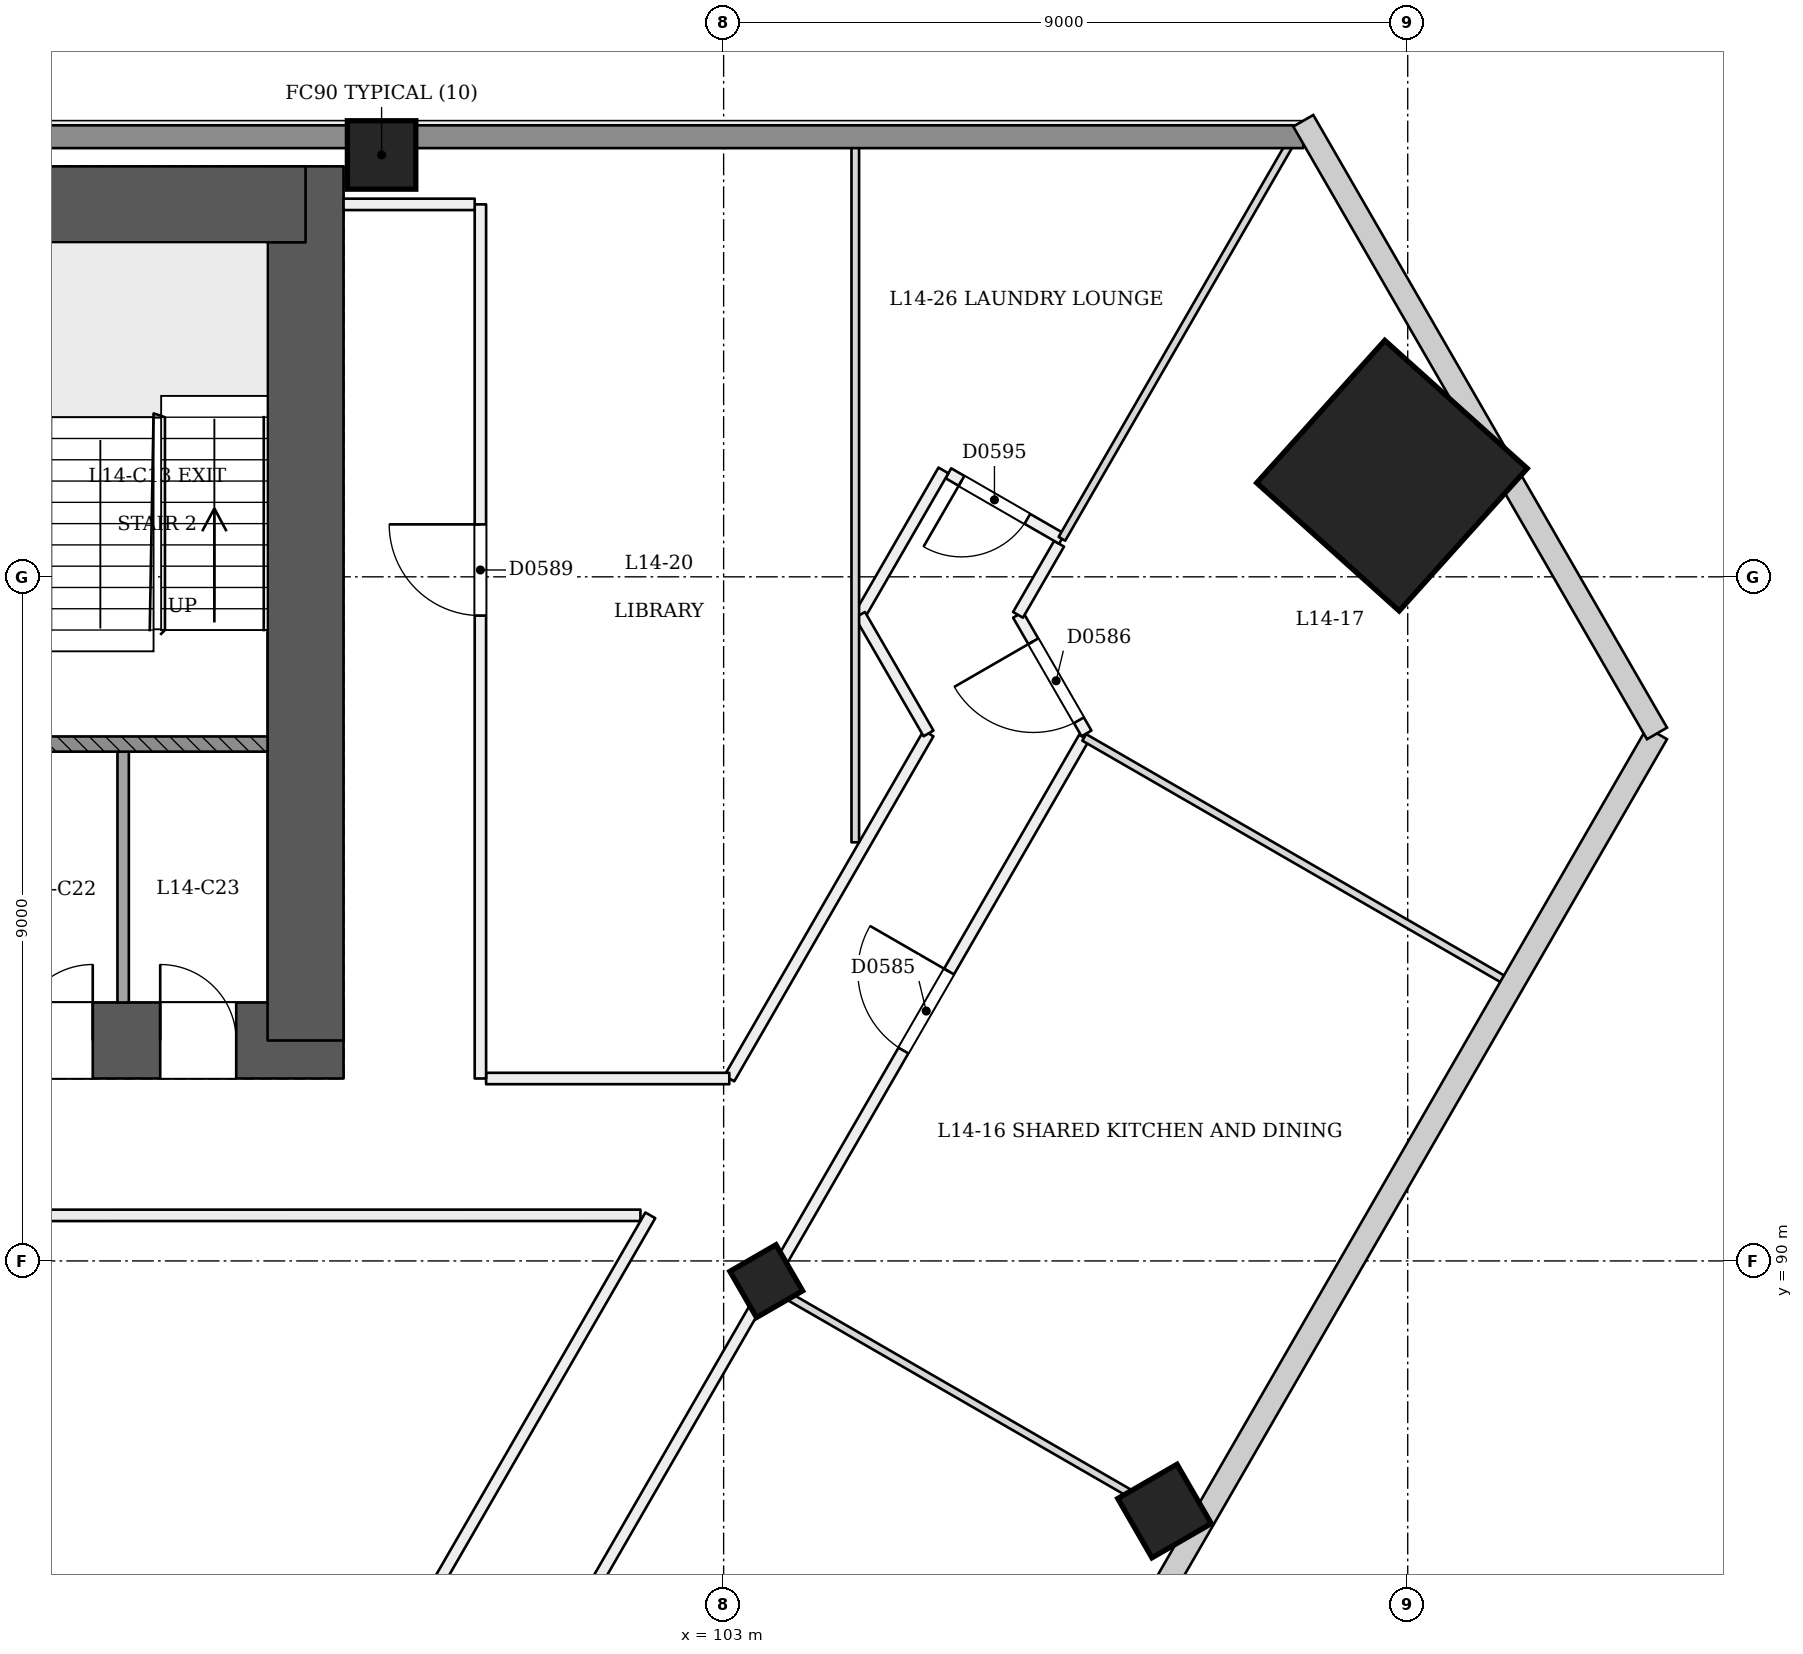
"""IFC4 building model, lengths in metres.
Left out: names, types, materials, properties, quantities, classifications, styles, units other than length and angle.
Written with IfcOpenShell. Run it as: python <this file> out.ifc"""

import sys

from ifc_helpers import new_model, si_unit, direction, frame, frame_2d, origin, origin_2d, place, context, subcontext, project, spatial, rectangle, extrude, element, fill, save


model = new_model("IFC4")
c1 = context("Model", 3, precision=1e-05, world=origin(), true_north=direction((0.0, 1.0)))
c2 = subcontext(c1, "Body", "Model", "MODEL_VIEW")
j1 = project(units=[si_unit("LENGTHUNIT", "METRE"), si_unit("PLANEANGLEUNIT", "RADIAN")], contexts=[c1])
p1 = place(None, origin())
s1 = spatial("IfcSite", under=j1, at=p1, CompositionType="ELEMENT")
p2 = place(p1, origin())
s2 = spatial("IfcBuilding", under=s1, at=p2, CompositionType="ELEMENT")
p3 = place(p2, frame((0.0, 0.0, 59.4)))
s3 = spatial("IfcBuildingStorey", under=s2, at=p3, CompositionType="ELEMENT", Elevation=59.4)
p4 = place(p3, frame((72.5, 92.9, 0.0), z_axis=(0.0, 0.0, 1.0), x_axis=(1.0, 0.0, 0.0)))
e1 = element("IfcWall", 1, at=p4, inside=s3, PredefinedType="SHEAR", context=c2, shape_type="SweptSolid", body=[
    extrude(rectangle(XDim=25.5, YDim=1.0, at=frame_2d((12.75, 0.0))), origin(), (0.0, 0.0, 1.0), 3.6),
])
p5 = place(p4, frame((1.3, 0.0, 0.0)))
e2 = element("IfcOpeningElement", 2, at=p5, cuts=e1, PredefinedType="OPENING", context=c2, shape_type="SweptSolid", body=[
    extrude(rectangle(XDim=1.2, YDim=2.1, at=frame_2d((0.6, 1.05))), frame((0.0, 0.51, 0.0), z_axis=(0.0, -1.0, 0.0), x_axis=(1.0, 0.0, 0.0)), (0.0, 0.0, 1.0), 1.021),
])
p6 = place(p4, frame((3.5, 0.0, 0.0)))
e3 = element("IfcOpeningElement", 3, at=p6, cuts=e1, PredefinedType="OPENING", context=c2, shape_type="SweptSolid", body=[
    extrude(rectangle(XDim=1.2, YDim=2.1, at=frame_2d((0.6, 1.05))), frame((0.0, 0.51, 0.0), z_axis=(0.0, -1.0, 0.0), x_axis=(1.0, 0.0, 0.0)), (0.0, 0.0, 1.0), 1.021),
])
p7 = place(p4, frame((13.5, 0.0, 0.0)))
e4 = element("IfcOpeningElement", 4, at=p7, cuts=e1, PredefinedType="OPENING", context=c2, shape_type="SweptSolid", body=[
    extrude(rectangle(XDim=1.2, YDim=2.1, at=frame_2d((0.6, 1.05))), frame((0.0, 0.51, 0.0), z_axis=(0.0, -1.0, 0.0), x_axis=(1.0, 0.0, 0.0)), (0.0, 0.0, 1.0), 1.021),
])
p8 = place(p4, frame((15.462, 0.0, 0.0)))
e5 = element("IfcOpeningElement", 5, at=p8, cuts=e1, PredefinedType="OPENING", context=c2, shape_type="SweptSolid", body=[
    extrude(rectangle(XDim=1.0, YDim=2.1, at=frame_2d((0.5, 1.05))), frame((0.0, 0.51, 0.0), z_axis=(0.0, -1.0, 0.0), x_axis=(1.0, 0.0, 0.0)), (0.0, 0.0, 1.0), 1.021),
])
p9 = place(p4, frame((18.3, 0.0, 0.0)))
e6 = element("IfcOpeningElement", 6, at=p9, cuts=e1, PredefinedType="OPENING", context=c2, shape_type="SweptSolid", body=[
    extrude(rectangle(XDim=1.0, YDim=2.1, at=frame_2d((0.5, 1.05))), frame((0.0, 0.51, 0.0), z_axis=(0.0, -1.0, 0.0), x_axis=(1.0, 0.0, 0.0)), (0.0, 0.0, 1.0), 1.021),
])
p10 = place(p4, frame((21.2, 0.0, 0.0)))
e7 = element("IfcOpeningElement", 7, at=p10, cuts=e1, PredefinedType="OPENING", context=c2, shape_type="SweptSolid", body=[
    extrude(rectangle(XDim=1.0, YDim=2.1, at=frame_2d((0.5, 1.05))), frame((0.0, 0.51, 0.0), z_axis=(0.0, -1.0, 0.0), x_axis=(1.0, 0.0, 0.0)), (0.0, 0.0, 1.0), 1.021),
])
p11 = place(p4, frame((23.087, 0.0, 0.0)))
e8 = element("IfcOpeningElement", 8, at=p11, cuts=e1, PredefinedType="OPENING", context=c2, shape_type="SweptSolid", body=[
    extrude(rectangle(XDim=1.0, YDim=2.1, at=frame_2d((0.5, 1.05))), frame((0.0, 0.51, 0.0), z_axis=(0.0, -1.0, 0.0), x_axis=(1.0, 0.0, 0.0)), (0.0, 0.0, 1.0), 1.021),
])
p12 = place(p3, frame((97.5, 92.9, 0.0), z_axis=(0.0, 0.0, 1.0), x_axis=(0.0, 1.0, 0.0)))
e9 = element("IfcWall", 9, at=p12, inside=s3, PredefinedType="SHEAR", context=c2, shape_type="SweptSolid", body=[
    extrude(rectangle(XDim=11.5, YDim=1.0, at=frame_2d((5.75, 0.0))), origin(), (0.0, 0.0, 1.0), 3.6),
])
p13 = place(p3, frame((97.5, 103.9, 0.0), z_axis=(0.0, 0.0, 1.0), x_axis=(-1.0, 0.0, 0.0)))
e10 = element("IfcWall", 10, at=p13, inside=s3, PredefinedType="SHEAR", context=c2, shape_type="SweptSolid", body=[
    extrude(rectangle(XDim=25.5, YDim=1.0, at=frame_2d((12.75, 0.0))), origin(), (0.0, 0.0, 1.0), 3.6),
])
p14 = place(p3, frame((103.588, 89.688, -0.021), z_axis=(-0.02215369191, 0.038413282303, 0.999016333038), x_axis=(-0.500657396395, -0.86536153355, 0.022171776814)))
e11 = element("IfcColumn", 11, at=p14, inside=s3, PredefinedType="COLUMN", context=c2, shape_type="SweptSolid", body=[
    extrude(rectangle(XDim=0.7, YDim=0.7, at=origin_2d()), origin(), (0.0, 0.0, 1.0), 3.604),
])
p15 = place(p3, frame((111.827, 100.32, 0.0), z_axis=(-0.028401796786, 0.009286506348, 0.999553449666), x_axis=(0.498886398949, -0.86638237317, 0.022224860049)))
e12 = element("IfcColumn", 12, at=p15, inside=s3, PredefinedType="COLUMN", context=c2, shape_type="SweptSolid", body=[
    extrude(rectangle(XDim=2.52, YDim=2.52, at=origin_2d()), origin(), (0.0, 0.0, 1.0), 3.602),
])
p16 = place(p3, frame((98.5, 104.55, 0.0), z_axis=(0.0, 0.0, 1.0), x_axis=(1.0, 0.0, 0.0)))
e13 = element("IfcColumn", 13, at=p16, inside=s3, PredefinedType="COLUMN", context=c2, shape_type="SweptSolid", body=[
    extrude(rectangle(XDim=0.9, YDim=0.9, at=origin_2d()), origin(), (0.0, 0.0, 1.0), 3.6),
])
p17 = place(p3, frame((108.828, 86.662, -0.027), z_axis=(-0.022222852987, 0.038483477124, 0.999012095419), x_axis=(-0.500174611287, -0.865639447942, 0.022219459744)))
e14 = element("IfcColumn", 14, at=p17, inside=s3, PredefinedType="COLUMN", context=c2, shape_type="SweptSolid", body=[
    extrude(rectangle(XDim=0.9, YDim=0.9, at=origin_2d()), origin(), (0.0, 0.0, 1.0), 3.604),
])
p18 = place(p3, frame((85.931, 59.106, 0.0), z_axis=(0.0, 0.0, 1.0), x_axis=(0.499999543107, 0.866025667572, 0.0)))
e15 = element("IfcWall", 15, at=p18, inside=s3, PredefinedType="PARTITIONING", context=c2, shape_type="SweptSolid", body=[
    extrude(rectangle(XDim=43.626, YDim=0.15, at=frame_2d((21.813, 0.0))), origin(), (0.0, 0.0, 1.0), 2.7),
])
p19 = place(p18, frame((3.556, 0.0, 0.0)))
e16 = element("IfcOpeningElement", 16, at=p19, cuts=e15, PredefinedType="OPENING", context=c2, shape_type="SweptSolid", body=[
    extrude(rectangle(XDim=1.2, YDim=2.1, at=frame_2d((0.6, 1.05))), frame((0.0, 0.085, 0.0), z_axis=(0.0, -1.0, 0.0), x_axis=(1.0, 0.0, 0.0)), (0.0, 0.0, 1.0), 0.171),
])
p20 = place(p18, frame((14.463, 0.0, 0.0)))
e17 = element("IfcOpeningElement", 17, at=p20, cuts=e15, PredefinedType="OPENING", context=c2, shape_type="SweptSolid", body=[
    extrude(rectangle(XDim=1.2, YDim=2.1, at=frame_2d((0.6, 1.05))), frame((0.0, 0.085, 0.0), z_axis=(0.0, -1.0, 0.0), x_axis=(1.0, 0.0, 0.0)), (0.0, 0.0, 1.0), 0.171),
])
p21 = place(p18, frame((27.963, 0.0, 0.0)))
e18 = element("IfcOpeningElement", 18, at=p21, cuts=e15, PredefinedType="OPENING", context=c2, shape_type="SweptSolid", body=[
    extrude(rectangle(XDim=1.2, YDim=2.1, at=frame_2d((0.6, 1.05))), frame((0.0, 0.085, 0.0), z_axis=(0.0, -1.0, 0.0), x_axis=(1.0, 0.0, 0.0)), (0.0, 0.0, 1.0), 0.171),
])
p22 = place(p18, frame((38.869, 0.0, 0.0)))
e19 = element("IfcOpeningElement", 19, at=p22, cuts=e15, PredefinedType="OPENING", context=c2, shape_type="SweptSolid", body=[
    extrude(rectangle(XDim=1.2, YDim=2.1, at=frame_2d((0.6, 1.05))), frame((0.0, 0.085, 0.0), z_axis=(0.0, -1.0, 0.0), x_axis=(1.0, 0.0, 0.0)), (0.0, 0.0, 1.0), 0.171),
])
p23 = place(p3, frame((107.774, 96.94, 0.0), z_axis=(0.0, 0.0, 1.0), x_axis=(-0.500015694476, 0.866016342385, 0.0)))
e20 = element("IfcWall", 20, at=p23, inside=s3, PredefinedType="PARTITIONING", context=c2, shape_type="SweptSolid", body=[
    extrude(rectangle(XDim=1.802, YDim=0.15, at=frame_2d((0.901, 0.0))), origin(), (0.0, 0.0, 1.0), 3.1),
])
p24 = place(p23, frame((0.2, 0.0, 0.0)))
e21 = element("IfcOpeningElement", 21, at=p24, cuts=e20, PredefinedType="OPENING", context=c2, shape_type="SweptSolid", body=[
    extrude(rectangle(XDim=1.2, YDim=2.1, at=frame_2d((0.6, 1.05))), frame((0.0, 0.085, 0.0), z_axis=(0.0, -1.0, 0.0), x_axis=(1.0, 0.0, 0.0)), (0.0, 0.0, 1.0), 0.171),
])
p25 = place(p3, frame((106.873, 98.5, 0.0), z_axis=(0.0, 0.0, 1.0), x_axis=(0.499957341738, 0.866050031143, 0.0)))
e22 = element("IfcWall", 22, at=p25, inside=s3, PredefinedType="PARTITIONING", context=c2, shape_type="SweptSolid", body=[
    extrude(rectangle(XDim=1.08, YDim=0.15, at=frame_2d((0.54, 0.0))), origin(), (0.0, 0.0, 1.0), 3.1),
])
p26 = place(p3, frame((102.035, 90.6, 0.0), z_axis=(0.0, 0.0, 1.0), x_axis=(-0.49999785657, -0.866026641291, 0.0)))
e23 = element("IfcWall", 23, at=p26, inside=s3, PredefinedType="PARTITIONING", context=c2, shape_type="SweptSolid", body=[
    extrude(rectangle(XDim=34.071, YDim=0.15, at=frame_2d((17.036, 0.0))), origin(), (0.0, 0.0, 1.0), 3.1),
])
p27 = place(p26, frame((25.659, 0.0, 0.0)))
e24 = element("IfcOpeningElement", 24, at=p27, cuts=e23, PredefinedType="OPENING", context=c2, shape_type="SweptSolid", body=[
    extrude(rectangle(XDim=1.2, YDim=2.1, at=frame_2d((0.6, 1.05))), frame((0.0, 0.085, 0.0), z_axis=(0.0, -1.0, 0.0), x_axis=(1.0, 0.0, 0.0)), (0.0, 0.0, 1.0), 0.171),
])
p28 = place(p26, frame((6.829, 0.0, 0.0)))
e25 = element("IfcOpeningElement", 25, at=p28, cuts=e23, PredefinedType="OPENING", context=c2, shape_type="SweptSolid", body=[
    extrude(rectangle(XDim=1.2, YDim=2.1, at=frame_2d((0.6, 1.05))), frame((0.0, 0.085, 0.0), z_axis=(0.0, -1.0, 0.0), x_axis=(1.0, 0.0, 0.0)), (0.0, 0.0, 1.0), 0.171),
])
p29 = place(p3, frame((88.0, 90.599, 0.0), z_axis=(0.0, 0.0, 1.0), x_axis=(0.999999997534, 7.0228418e-05, 0.0)))
e26 = element("IfcWall", 26, at=p29, inside=s3, PredefinedType="PARTITIONING", context=c2, shape_type="SweptSolid", body=[
    extrude(rectangle(XDim=13.906, YDim=0.15, at=frame_2d((6.953, 0.0))), origin(), (0.0, 0.0, 1.0), 3.1),
])
p30 = place(p29, frame((0.2, 0.0, 0.0)))
e27 = element("IfcOpeningElement", 27, at=p30, cuts=e26, PredefinedType="OPENING", context=c2, shape_type="SweptSolid", body=[
    extrude(rectangle(XDim=1.2, YDim=2.1, at=frame_2d((0.6, 1.05))), frame((0.0, 0.085, 0.0), z_axis=(0.0, -1.0, 0.0), x_axis=(1.0, 0.0, 0.0)), (0.0, 0.0, 1.0), 0.171),
])
p31 = place(p3, frame((105.696, 96.94, 0.0), z_axis=(0.0, 0.0, 1.0), x_axis=(-0.499971068387, -0.866042106815, 0.0)))
e28 = element("IfcWall", 28, at=p31, inside=s3, PredefinedType="PARTITIONING", context=c2, shape_type="SweptSolid", body=[
    extrude(rectangle(XDim=5.242, YDim=0.15, at=frame_2d((2.621, 0.0))), origin(), (0.0, 0.0, 1.0), 3.1),
])
p32 = place(p3, frame((103.075, 92.4, 0.0), z_axis=(0.0, 0.0, 1.0), x_axis=(-1.0, 0.0, 0.0)))
e29 = element("IfcWall", 29, at=p32, inside=s3, PredefinedType="PARTITIONING", context=c2, shape_type="SweptSolid", body=[
    extrude(rectangle(XDim=3.2, YDim=0.15, at=frame_2d((1.6, 0.0))), origin(), (0.0, 0.0, 1.0), 3.1),
])
p33 = place(p3, frame((99.8, 92.4, 0.0), z_axis=(0.0, 0.0, 1.0), x_axis=(0.0, 1.0, 0.0)))
e30 = element("IfcWall", 30, at=p33, inside=s3, PredefinedType="PARTITIONING", context=c2, shape_type="SweptSolid", body=[
    extrude(rectangle(XDim=11.5, YDim=0.15, at=frame_2d((5.75, 0.0))), origin(), (0.0, 0.0, 1.0), 2.6),
])
p34 = place(p33, frame((6.09, 0.0, 0.0)))
e31 = element("IfcOpeningElement", 31, at=p34, cuts=e30, PredefinedType="OPENING", context=c2, shape_type="SweptSolid", body=[
    extrude(rectangle(XDim=1.2, YDim=2.1, at=frame_2d((0.6, 1.05))), frame((0.0, 0.085, 0.0), z_axis=(0.0, -1.0, 0.0), x_axis=(1.0, 0.0, 0.0)), (0.0, 0.0, 1.0), 0.171),
])
p35 = place(p3, frame((99.725, 103.9, 0.0), z_axis=(0.0, 0.0, 1.0), x_axis=(-1.0, 0.0, 0.0)))
e32 = element("IfcWall", 32, at=p35, inside=s3, PredefinedType="PARTITIONING", context=c2, shape_type="SweptSolid", body=[
    extrude(rectangle(XDim=1.725, YDim=0.15, at=frame_2d((0.863, 0.0))), origin(), (0.0, 0.0, 1.0), 2.6),
])
p36 = place(p3, frame((107.45, 99.5, 0.0), z_axis=(0.0, 0.0, 1.0), x_axis=(-0.866013532718, 0.500020560727, 0.0)))
e33 = element("IfcWall", 33, at=p36, inside=s3, PredefinedType="PARTITIONING", context=c2, shape_type="SweptSolid", body=[
    extrude(rectangle(XDim=1.725, YDim=0.15, at=frame_2d((0.863, 0.0))), origin(), (0.0, 0.0, 1.0), 3.1),
])
p37 = place(p36, frame((0.525, 0.0, 0.0)))
e34 = element("IfcOpeningElement", 34, at=p37, cuts=e33, PredefinedType="OPENING", context=c2, shape_type="SweptSolid", body=[
    extrude(rectangle(XDim=1.0, YDim=2.1, at=frame_2d((0.5, 1.05))), frame((0.0, 0.085, 0.0), z_axis=(0.0, -1.0, 0.0), x_axis=(1.0, 0.0, 0.0)), (0.0, 0.0, 1.0), 0.171),
])
p38 = place(p3, frame((105.892, 100.4, 0.0), z_axis=(0.0, 0.0, 1.0), x_axis=(-0.500005024956, -0.866022502605, 0.0)))
e35 = element("IfcWall", 35, at=p38, inside=s3, PredefinedType="PARTITIONING", context=c2, shape_type="SweptSolid", body=[
    extrude(rectangle(XDim=2.194, YDim=0.15, at=frame_2d((1.097, 0.0))), origin(), (0.0, 0.0, 1.0), 3.1),
])
p39 = place(p3, frame((104.795, 98.5, 0.0), z_axis=(0.0, 0.0, 1.0), x_axis=(0.500015694476, -0.866016342385, 0.0)))
e36 = element("IfcWall", 36, at=p39, inside=s3, PredefinedType="PARTITIONING", context=c2, shape_type="SweptSolid", body=[
    extrude(rectangle(XDim=1.802, YDim=0.15, at=frame_2d((0.901, 0.0))), origin(), (0.0, 0.0, 1.0), 3.1),
])
p40 = place(p3, frame((109.13, 86.488, 0.0), z_axis=(0.0, 0.0, 1.0), x_axis=(-0.866042250622, 0.499970819286, 0.0)))
e37 = element("IfcWall", 37, at=p40, inside=s3, PredefinedType="PARTITIONING", context=c2, shape_type="SweptSolid", body=[
    extrude(rectangle(XDim=6.325, YDim=0.1, at=frame_2d((3.163, 0.0))), origin(), (0.0, 0.0, 1.0), 2.6),
])
p41 = place(p3, frame((113.287, 93.688, 0.0), z_axis=(0.0, 0.0, 1.0), x_axis=(-0.866035036182, 0.499983315828, 0.0)))
e38 = element("IfcWall", 38, at=p41, inside=s3, PredefinedType="PARTITIONING", context=c2, shape_type="SweptSolid", body=[
    extrude(rectangle(XDim=6.4, YDim=0.1, at=frame_2d((3.2, 0.0))), origin(), (0.0, 0.0, 1.0), 2.6),
])
p42 = place(p3, frame((110.568, 104.9, 0.0), z_axis=(0.0, 0.0, 1.0), x_axis=(-0.500034261589, -0.866005621943, 0.0)))
e39 = element("IfcWall", 39, at=p42, inside=s3, PredefinedType="PARTITIONING", context=c2, shape_type="SweptSolid", body=[
    extrude(rectangle(XDim=6.235, YDim=0.1, at=frame_2d((3.118, 0.0))), origin(), (0.0, 0.0, 1.0), 2.6),
])
p43 = place(p3, frame((104.732, 95.507, 0.0), z_axis=(0.0, 0.0, 1.0), x_axis=(0.0, 1.0, 0.0)))
e40 = element("IfcWall", 40, at=p43, inside=s3, PredefinedType="PARTITIONING", context=c2, shape_type="SweptSolid", body=[
    extrude(rectangle(XDim=9.393, YDim=0.1, at=frame_2d((4.696, 0.0))), origin(), (0.0, 0.0, 1.0), 2.6),
])
p44 = place(p3, frame((59.374, 104.79, 0.0), z_axis=(0.0, 0.0, 1.0), x_axis=(1.0, 0.0, 0.0)))
e41 = element("IfcWall", 41, at=p44, inside=s3, PredefinedType="SOLIDWALL", context=c2, shape_type="SweptSolid", body=[
    extrude(rectangle(XDim=51.252, YDim=0.3, at=frame_2d((25.626, 0.0))), origin(), (0.0, 0.0, 1.0), 2.6),
])
p45 = place(p3, frame((95.1, 93.4, 0.0), z_axis=(0.0, 0.0, 1.0), x_axis=(0.0, 1.0, 0.0)))
e42 = element("IfcWall", 42, at=p45, inside=s3, PredefinedType="PARTITIONING", context=c2, shape_type="SweptSolid", body=[
    extrude(rectangle(XDim=3.3, YDim=0.15, at=frame_2d((1.65, 0.0))), origin(), (0.0, 0.0, 1.0), 3.1),
])
p46 = place(p3, frame((94.1, 96.8, 0.0), z_axis=(0.0, 0.0, 1.0), x_axis=(1.0, 0.0, 0.0)))
e43 = element("IfcWall", 43, at=p46, inside=s3, PredefinedType="SOLIDWALL", context=c2, shape_type="SweptSolid", body=[
    extrude(rectangle(XDim=2.9, YDim=0.2, at=frame_2d((1.45, 0.0))), origin(), (0.0, 0.0, 1.0), 3.1),
])
p47 = place(p22, origin())
e44 = element("IfcDoor", 44, at=p47, inside=s3, OperationType="SINGLE_SWING_RIGHT", PredefinedType="NOTDEFINED", context=c2, shape_type="SweptSolid", body=[
    extrude(rectangle(XDim=1.2, YDim=2.1, at=frame_2d((0.6, 1.05))), frame((0.0, 0.025, 0.0), z_axis=(0.0, -1.0, 0.0), x_axis=(1.0, 0.0, 0.0)), (0.0, 0.0, 1.0), 0.05),
])
fill(e19, e44)
p48 = place(p24, origin())
e45 = element("IfcDoor", 45, at=p48, inside=s3, OperationType="SINGLE_SWING_RIGHT", PredefinedType="NOTDEFINED", context=c2, shape_type="SweptSolid", body=[
    extrude(rectangle(XDim=1.2, YDim=2.1, at=frame_2d((0.6, 1.05))), frame((0.0, 0.025, 0.0), z_axis=(0.0, -1.0, 0.0), x_axis=(1.0, 0.0, 0.0)), (0.0, 0.0, 1.0), 0.05),
])
fill(e21, e45)
p49 = place(p34, origin())
e46 = element("IfcDoor", 46, at=p49, inside=s3, OperationType="SINGLE_SWING_RIGHT", PredefinedType="NOTDEFINED", context=c2, shape_type="SweptSolid", body=[
    extrude(rectangle(XDim=1.2, YDim=2.1, at=frame_2d((0.6, 1.05))), frame((0.0, 0.025, 0.0), z_axis=(0.0, -1.0, 0.0), x_axis=(1.0, 0.0, 0.0)), (0.0, 0.0, 1.0), 0.05),
])
fill(e31, e46)
p50 = place(p37, origin())
e47 = element("IfcDoor", 47, at=p50, inside=s3, OperationType="SINGLE_SWING_RIGHT", PredefinedType="NOTDEFINED", context=c2, shape_type="SweptSolid", body=[
    extrude(rectangle(XDim=1.0, YDim=2.1, at=frame_2d((0.5, 1.05))), frame((0.0, 0.025, 0.0), z_axis=(0.0, -1.0, 0.0), x_axis=(1.0, 0.0, 0.0)), (0.0, 0.0, 1.0), 0.05),
])
fill(e34, e47)
p51 = place(p10, origin())
e48 = element("IfcDoor", 48, at=p51, inside=s3, OperationType="SINGLE_SWING_RIGHT", PredefinedType="NOTDEFINED", context=c2, shape_type="SweptSolid", body=[
    extrude(rectangle(XDim=1.0, YDim=2.1, at=frame_2d((0.5, 1.05))), frame((0.0, 0.025, 0.0), z_axis=(0.0, -1.0, 0.0), x_axis=(1.0, 0.0, 0.0)), (0.0, 0.0, 1.0), 0.05),
])
fill(e7, e48)
p52 = place(p11, origin())
e49 = element("IfcDoor", 49, at=p52, inside=s3, OperationType="SINGLE_SWING_LEFT", PredefinedType="NOTDEFINED", context=c2, shape_type="SweptSolid", body=[
    extrude(rectangle(XDim=1.0, YDim=2.1, at=frame_2d((0.5, 1.05))), frame((0.0, 0.025, 0.0), z_axis=(0.0, -1.0, 0.0), x_axis=(1.0, 0.0, 0.0)), (0.0, 0.0, 1.0), 0.05),
])
fill(e8, e49)
save(model, sys.argv[1])
